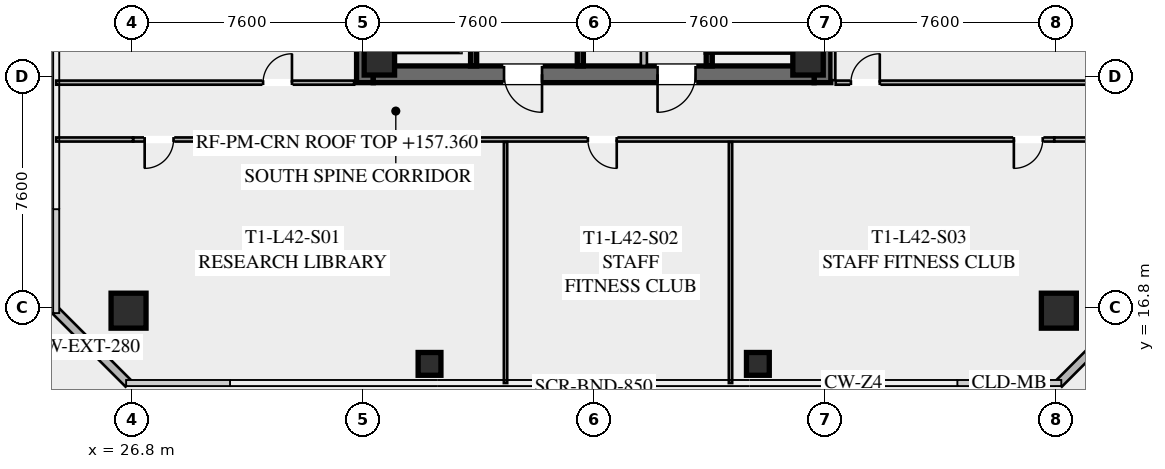
"""IFC4 building model, lengths in metres.
Left out: names, types, materials, properties, quantities, classifications, styles, units other than length and angle.
Written with IfcOpenShell. Run it as: python <this file> out.ifc"""

import sys

from ifc_helpers import new_model, si_unit, direction, frame, frame_2d, origin, origin_2d, place, context, subcontext, project, spatial, rectangle, hollow_rectangle, extrude, element, fill, save


model = new_model("IFC4")
c1 = context("Model", 3, precision=1e-05, world=origin(), true_north=direction((0.0, 1.0)))
c2 = subcontext(c1, "Body", "Model", "MODEL_VIEW")
j1 = project(units=[si_unit("LENGTHUNIT", "METRE"), si_unit("PLANEANGLEUNIT", "RADIAN")], contexts=[c1])
p1 = place(None, origin())
s1 = spatial("IfcSite", under=j1, at=p1, CompositionType="ELEMENT")
p2 = place(p1, origin())
s2 = spatial("IfcBuilding", under=s1, at=p2, CompositionType="ELEMENT")
p3 = place(p2, frame((0.0, 0.0, 157.0)))
s3 = spatial("IfcBuildingStorey", under=s2, at=p3, CompositionType="ELEMENT", Elevation=157.0)
for number, where, z_axis, x_axis in (
    (1, (34.475, 24.2, 0.0), (0.0, 0.0, 1.0), (0.0, 1.0, 0.0)),
    (2, (49.525, 39.8, 0.0), (0.0, 0.0, 1.0), (0.0, -1.0, 0.0)),
):
    element("IfcWall", number, at=place(p3, frame(where, z_axis=z_axis, x_axis=x_axis)), inside=s3, PredefinedType="SHEAR", context=c2, shape_type="SweptSolid", body=[
        extrude(rectangle(XDim=15.6, YDim=0.55, at=frame_2d((7.8, 0.0))), origin(), (0.0, 0.0, 1.0), 3.55),
    ])
p4 = place(p3, frame((49.25, 24.475, 0.0), z_axis=(0.0, 0.0, 1.0), x_axis=(-1.0, 0.0, 0.0)))
e3 = element("IfcWall", 3, at=p4, inside=s3, PredefinedType="SHEAR", context=c2, shape_type="SweptSolid", body=[
    extrude(rectangle(XDim=14.5, YDim=0.55, at=frame_2d((7.25, 0.0))), origin(), (0.0, 0.0, 1.0), 3.55),
])
p5 = place(p4, frame((8.95, 0.0, 0.0)))
e4 = element("IfcOpeningElement", 4, at=p5, cuts=e3, PredefinedType="OPENING", context=c2, shape_type="SweptSolid", body=[
    extrude(rectangle(XDim=1.25, YDim=2.25, at=frame_2d((0.625, 1.125))), frame((0.0, 0.285, 0.0), z_axis=(0.0, -1.0, 0.0), x_axis=(1.0, 0.0, 0.0)), (0.0, 0.0, 1.0), 0.57),
])
p6 = place(p4, frame((3.9, 0.0, 0.0)))
e5 = element("IfcOpeningElement", 5, at=p6, cuts=e3, PredefinedType="OPENING", context=c2, shape_type="SweptSolid", body=[
    extrude(rectangle(XDim=1.25, YDim=2.25, at=frame_2d((0.625, 1.125))), frame((0.0, 0.285, 0.0), z_axis=(0.0, -1.0, 0.0), x_axis=(1.0, 0.0, 0.0)), (0.0, 0.0, 1.0), 0.57),
])
for number, where, z_axis, x_axis in (
    (6, (34.95, 24.95, 0.0), (0.0, 0.0, 1.0), (1.0, 0.0, 0.0)),
    (7, (49.05, 24.95, 0.0), (0.0, 0.0, 1.0), (1.0, 0.0, 0.0)),
):
    element("IfcColumn", number, at=place(p3, frame(where, z_axis=z_axis, x_axis=x_axis)), inside=s3, PredefinedType="COLUMN", context=c2, shape_type="SweptSolid", body=[
        extrude(hollow_rectangle(XDim=1.0, YDim=1.0, WallThickness=0.04, at=origin_2d()), origin(), (0.0, 0.0, 1.0), 3.37),
    ])
for number, where, z_axis, x_axis in (
    (8, (26.7, 16.7, -0.175), (0.0, 0.0, 1.0), (1.0, 0.0, 0.0)),
    (9, (57.3, 16.7, -0.175), (0.0, 0.0, 1.0), (1.0, 0.0, 0.0)),
):
    element("IfcColumn", number, at=place(p3, frame(where, z_axis=z_axis, x_axis=x_axis)), inside=s3, PredefinedType="COLUMN", context=c2, shape_type="SweptSolid", body=[
        extrude(hollow_rectangle(XDim=1.15, YDim=1.15, WallThickness=0.045, at=origin_2d()), origin(), (0.0, 0.0, 1.0), 3.545),
    ])
for number, where, z_axis, x_axis in (
    (10, (36.6, 14.95, -0.175), (0.0, 0.0, 1.0), (1.0, 0.0, 0.0)),
    (11, (47.4, 14.95, -0.175), (0.0, 0.0, 1.0), (1.0, 0.0, 0.0)),
):
    element("IfcColumn", number, at=place(p3, frame(where, z_axis=z_axis, x_axis=x_axis)), inside=s3, PredefinedType="COLUMN", context=c2, shape_type="SweptSolid", body=[
        extrude(hollow_rectangle(XDim=0.75, YDim=0.75, WallThickness=0.032, at=origin_2d()), origin(), (0.0, 0.0, 1.0), 3.545),
    ])
for number, where, z_axis, x_axis in (
    (12, (26.7, 14.3, 0.0), (0.0, 0.0, 1.0), (-0.707, 0.707, 0.0)),
    (13, (59.7, 16.7, 0.0), (0.0, 0.0, 1.0), (-0.707, -0.707, 0.0)),
):
    element("IfcWall", number, at=place(p3, frame(where, z_axis=z_axis, x_axis=x_axis)), inside=s3, PredefinedType="SOLIDWALL", context=c2, shape_type="SweptSolid", body=[
        extrude(rectangle(XDim=3.394, YDim=0.28, at=frame_2d((1.697, 0.0))), origin(), (0.0, 0.0, 1.0), 3.37),
    ])
p7 = place(p3, frame((45.8, 32.8, 0.0), z_axis=(0.0, 0.0, 1.0), x_axis=(0.0, -1.0, 0.0)))
e14 = element("IfcWall", 14, at=p7, inside=s3, PredefinedType="SHEAR", context=c2, shape_type="SweptSolid", body=[
    extrude(rectangle(XDim=8.05, YDim=0.2, at=frame_2d((4.025, 0.0))), origin(), (0.0, 0.0, 1.0), 3.37),
])
p8 = place(p7, frame((0.45, 0.0, 0.0)))
e15 = element("IfcOpeningElement", 15, at=p8, cuts=e14, PredefinedType="OPENING", context=c2, shape_type="SweptSolid", body=[
    extrude(rectangle(XDim=1.15, YDim=2.2, at=frame_2d((0.575, 1.1))), frame((0.0, 0.11, 0.0), z_axis=(0.0, -1.0, 0.0), x_axis=(1.0, 0.0, 0.0)), (0.0, 0.0, 1.0), 0.22),
])
p9 = place(p3, frame((41.56, 24.75, 0.0), z_axis=(0.0, 0.0, 1.0), x_axis=(0.0, 1.0, 0.0)))
e16 = element("IfcWall", 16, at=p9, inside=s3, PredefinedType="SHEAR", context=c2, shape_type="SweptSolid", body=[
    extrude(rectangle(XDim=14.5, YDim=0.2, at=frame_2d((7.25, 0.0))), origin(), (0.0, 0.0, 1.0), 3.37),
])
p10 = place(p3, frame((38.05, 24.75, 0.0), z_axis=(0.0, 0.0, 1.0), x_axis=(0.0, 1.0, 0.0)))
e17 = element("IfcWall", 17, at=p10, inside=s3, PredefinedType="SHEAR", context=c2, shape_type="SweptSolid", body=[
    extrude(rectangle(XDim=6.45, YDim=0.2, at=frame_2d((3.225, 0.0))), origin(), (0.0, 0.0, 1.0), 3.37),
])
p11 = place(p10, frame((4.875, 0.0, 0.0)))
e18 = element("IfcOpeningElement", 18, at=p11, cuts=e17, PredefinedType="OPENING", context=c2, shape_type="SweptSolid", body=[
    extrude(rectangle(XDim=1.3, YDim=2.25, at=frame_2d((0.65, 1.125))), frame((0.0, 0.11, 0.0), z_axis=(0.0, -1.0, 0.0), x_axis=(1.0, 0.0, 0.0)), (0.0, 0.0, 1.0), 0.22),
])
p12 = place(p10, frame((2.875, 0.0, 0.0)))
e19 = element("IfcOpeningElement", 19, at=p12, cuts=e17, PredefinedType="OPENING", context=c2, shape_type="SweptSolid", body=[
    extrude(rectangle(XDim=1.3, YDim=2.25, at=frame_2d((0.65, 1.125))), frame((0.0, 0.11, 0.0), z_axis=(0.0, -1.0, 0.0), x_axis=(1.0, 0.0, 0.0)), (0.0, 0.0, 1.0), 0.22),
])
p13 = place(p10, frame((0.675, 0.0, 0.0)))
e20 = element("IfcOpeningElement", 20, at=p13, cuts=e17, PredefinedType="OPENING", context=c2, shape_type="SweptSolid", body=[
    extrude(rectangle(XDim=1.3, YDim=2.25, at=frame_2d((0.65, 1.125))), frame((0.0, 0.11, 0.0), z_axis=(0.0, -1.0, 0.0), x_axis=(1.0, 0.0, 0.0)), (0.0, 0.0, 1.0), 0.22),
])
p14 = place(p3, frame((43.65, 24.75, 0.0), z_axis=(0.0, 0.0, 1.0), x_axis=(0.0, 1.0, 0.0)))
e21 = element("IfcWall", 21, at=p14, inside=s3, PredefinedType="SOLIDWALL", context=c2, shape_type="SweptSolid", body=[
    extrude(rectangle(XDim=6.9, YDim=0.2, at=frame_2d((3.45, 0.0))), origin(), (0.0, 0.0, 1.0), 2.723),
])
p15 = place(p14, frame((0.85, 0.0, 0.0)))
e22 = element("IfcOpeningElement", 22, at=p15, cuts=e21, PredefinedType="OPENING", context=c2, shape_type="SweptSolid", body=[
    extrude(rectangle(XDim=0.95, YDim=2.05, at=frame_2d((0.475, 1.025))), frame((0.0, 0.11, 0.0), z_axis=(0.0, -1.0, 0.0), x_axis=(1.0, 0.0, 0.0)), (0.0, 0.0, 1.0), 0.22),
])
p16 = place(p14, frame((4.8, 0.0, 0.0)))
e23 = element("IfcOpeningElement", 23, at=p16, cuts=e21, PredefinedType="OPENING", context=c2, shape_type="SweptSolid", body=[
    extrude(rectangle(XDim=1.05, YDim=2.2, at=frame_2d((0.525, 1.1))), frame((0.0, 0.11, 0.0), z_axis=(0.0, -1.0, 0.0), x_axis=(1.0, 0.0, 0.0)), (0.0, 0.0, 1.0), 0.22),
])
p17 = place(p3, frame((57.15, 22.33, 0.0), z_axis=(0.0, 0.0, 1.0), x_axis=(-1.0, 0.0, 0.0)))
e24 = element("IfcWall", 24, at=p17, inside=s3, PredefinedType="PARTITIONING", context=c2, shape_type="SweptSolid", body=[
    extrude(rectangle(XDim=30.3, YDim=0.135, at=frame_2d((15.15, 0.0))), origin(), (0.0, 0.0, 1.0), 2.723),
])
p18 = place(p17, frame((28.97, 0.0, 0.0)))
e25 = element("IfcOpeningElement", 25, at=p18, cuts=e24, PredefinedType="OPENING", context=c2, shape_type="SweptSolid", body=[
    extrude(rectangle(XDim=0.95, YDim=2.05, at=frame_2d((0.475, 1.025))), frame((0.0, 0.077, 0.0), z_axis=(0.0, -1.0, 0.0), x_axis=(1.0, 0.0, 0.0)), (0.0, 0.0, 1.0), 0.155),
])
p19 = place(p17, frame((14.392, 0.0, 0.0)))
e26 = element("IfcOpeningElement", 26, at=p19, cuts=e24, PredefinedType="OPENING", context=c2, shape_type="SweptSolid", body=[
    extrude(rectangle(XDim=0.95, YDim=2.05, at=frame_2d((0.475, 1.025))), frame((0.0, 0.077, 0.0), z_axis=(0.0, -1.0, 0.0), x_axis=(1.0, 0.0, 0.0)), (0.0, 0.0, 1.0), 0.155),
])
p20 = place(p17, frame((0.38, 0.0, 0.0)))
e27 = element("IfcOpeningElement", 27, at=p20, cuts=e24, PredefinedType="OPENING", context=c2, shape_type="SweptSolid", body=[
    extrude(rectangle(XDim=0.95, YDim=2.05, at=frame_2d((0.475, 1.025))), frame((0.0, 0.077, 0.0), z_axis=(0.0, -1.0, 0.0), x_axis=(1.0, 0.0, 0.0)), (0.0, 0.0, 1.0), 0.155),
])
for number, where, z_axis, x_axis in (
    (28, (24.32, 22.33, 0.0), (0.0, 0.0, 1.0), (1.0, 0.0, 0.0)),
    (29, (57.15, 22.33, 0.0), (0.0, 0.0, 1.0), (1.0, 0.0, 0.0)),
):
    element("IfcWall", number, at=place(p3, frame(where, z_axis=z_axis, x_axis=x_axis)), inside=s3, PredefinedType="PARTITIONING", context=c2, shape_type="SweptSolid", body=[
        extrude(rectangle(XDim=2.53, YDim=0.135, at=frame_2d((1.265, 0.0))), origin(), (0.0, 0.0, 1.0), 2.723),
    ])
for number, where, z_axis, x_axis in (
    (30, (39.1, 14.32, 0.0), (0.0, 0.0, 1.0), (0.0, 1.0, 0.0)),
    (31, (46.5, 14.32, 0.0), (0.0, 0.0, 1.0), (0.0, 1.0, 0.0)),
):
    element("IfcWall", number, at=place(p3, frame(where, z_axis=z_axis, x_axis=x_axis)), inside=s3, PredefinedType="PARTITIONING", context=c2, shape_type="SweptSolid", body=[
        extrude(rectangle(XDim=7.93, YDim=0.11, at=frame_2d((3.965, 0.0))), origin(), (0.0, 0.0, 1.0), 2.723),
    ])
p21 = place(p3, frame((49.88, 39.72, 0.0), z_axis=(0.0, 0.0, 1.0), x_axis=(0.0, -1.0, 0.0)))
e32 = element("IfcWall", 32, at=p21, inside=s3, PredefinedType="PARTITIONING", context=c2, shape_type="SweptSolid", body=[
    extrude(rectangle(XDim=15.44, YDim=0.135, at=frame_2d((7.72, 0.0))), origin(), (0.0, 0.0, 1.0), 2.723),
])
p22 = place(p3, frame((49.96, 24.2, 0.0), z_axis=(0.0, 0.0, 1.0), x_axis=(1.0, 0.0, 0.0)))
e33 = element("IfcWall", 33, at=p22, inside=s3, PredefinedType="PARTITIONING", context=c2, shape_type="SweptSolid", body=[
    extrude(rectangle(XDim=9.72, YDim=0.135, at=frame_2d((4.86, 0.0))), origin(), (0.0, 0.0, 1.0), 2.723),
])
p23 = place(p22, frame((0.5, 0.0, 0.0)))
e34 = element("IfcOpeningElement", 34, at=p23, cuts=e33, PredefinedType="OPENING", context=c2, shape_type="SweptSolid", body=[
    extrude(rectangle(XDim=0.95, YDim=2.05, at=frame_2d((0.475, 1.025))), frame((0.0, 0.077, 0.0), z_axis=(0.0, -1.0, 0.0), x_axis=(1.0, 0.0, 0.0)), (0.0, 0.0, 1.0), 0.155),
])
p24 = place(p3, frame((24.32, 24.2, 0.0), z_axis=(0.0, 0.0, 1.0), x_axis=(1.0, 0.0, 0.0)))
e35 = element("IfcWall", 35, at=p24, inside=s3, PredefinedType="PARTITIONING", context=c2, shape_type="SweptSolid", body=[
    extrude(rectangle(XDim=9.8, YDim=0.135, at=frame_2d((4.9, 0.0))), origin(), (0.0, 0.0, 1.0), 2.723),
])
p25 = place(p24, frame((6.805, 0.0, 0.0)))
e36 = element("IfcOpeningElement", 36, at=p25, cuts=e35, PredefinedType="OPENING", context=c2, shape_type="SweptSolid", body=[
    extrude(rectangle(XDim=0.95, YDim=2.05, at=frame_2d((0.475, 1.025))), frame((0.0, 0.077, 0.0), z_axis=(0.0, -1.0, 0.0), x_axis=(1.0, 0.0, 0.0)), (0.0, 0.0, 1.0), 0.155),
])
p26 = place(p5, origin())
e37 = element("IfcDoor", 37, at=p26, inside=s3, OperationType="SINGLE_SWING_LEFT", PredefinedType="DOOR", context=c2, shape_type="SweptSolid", body=[
    extrude(rectangle(XDim=1.25, YDim=2.25, at=frame_2d((0.625, 1.125))), frame((0.0, 0.025, 0.0), z_axis=(0.0, -1.0, 0.0), x_axis=(1.0, 0.0, 0.0)), (0.0, 0.0, 1.0), 0.05),
])
fill(e4, e37)
p27 = place(p6, origin())
e38 = element("IfcDoor", 38, at=p27, inside=s3, OperationType="SINGLE_SWING_RIGHT", PredefinedType="DOOR", context=c2, shape_type="SweptSolid", body=[
    extrude(rectangle(XDim=1.25, YDim=2.25, at=frame_2d((0.625, 1.125))), frame((0.0, 0.025, 0.0), z_axis=(0.0, -1.0, 0.0), x_axis=(1.0, 0.0, 0.0)), (0.0, 0.0, 1.0), 0.05),
])
fill(e5, e38)
p28 = place(p18, origin())
e39 = element("IfcDoor", 39, at=p28, inside=s3, OperationType="SINGLE_SWING_RIGHT", PredefinedType="DOOR", context=c2, shape_type="SweptSolid", body=[
    extrude(rectangle(XDim=0.95, YDim=2.05, at=frame_2d((0.475, 1.025))), frame((0.0, 0.025, 0.0), z_axis=(0.0, -1.0, 0.0), x_axis=(1.0, 0.0, 0.0)), (0.0, 0.0, 1.0), 0.05),
])
fill(e25, e39)
p29 = place(p19, origin())
e40 = element("IfcDoor", 40, at=p29, inside=s3, OperationType="SINGLE_SWING_LEFT", PredefinedType="DOOR", context=c2, shape_type="SweptSolid", body=[
    extrude(rectangle(XDim=0.95, YDim=2.05, at=frame_2d((0.475, 1.025))), frame((0.0, 0.025, 0.0), z_axis=(0.0, -1.0, 0.0), x_axis=(1.0, 0.0, 0.0)), (0.0, 0.0, 1.0), 0.05),
])
fill(e26, e40)
p30 = place(p20, origin())
e41 = element("IfcDoor", 41, at=p30, inside=s3, OperationType="SINGLE_SWING_RIGHT", PredefinedType="DOOR", context=c2, shape_type="SweptSolid", body=[
    extrude(rectangle(XDim=0.95, YDim=2.05, at=frame_2d((0.475, 1.025))), frame((0.0, 0.025, 0.0), z_axis=(0.0, -1.0, 0.0), x_axis=(1.0, 0.0, 0.0)), (0.0, 0.0, 1.0), 0.05),
])
fill(e27, e41)
p31 = place(p23, origin())
e42 = element("IfcDoor", 42, at=p31, inside=s3, OperationType="SINGLE_SWING_RIGHT", PredefinedType="DOOR", context=c2, shape_type="SweptSolid", body=[
    extrude(rectangle(XDim=0.95, YDim=2.05, at=frame_2d((0.475, 1.025))), frame((0.0, 0.025, 0.0), z_axis=(0.0, -1.0, 0.0), x_axis=(1.0, 0.0, 0.0)), (0.0, 0.0, 1.0), 0.05),
])
fill(e34, e42)
p32 = place(p25, origin())
e43 = element("IfcDoor", 43, at=p32, inside=s3, OperationType="SINGLE_SWING_RIGHT", PredefinedType="DOOR", context=c2, shape_type="SweptSolid", body=[
    extrude(rectangle(XDim=0.95, YDim=2.05, at=frame_2d((0.475, 1.025))), frame((0.0, 0.025, 0.0), z_axis=(0.0, -1.0, 0.0), x_axis=(1.0, 0.0, 0.0)), (0.0, 0.0, 1.0), 0.05),
])
fill(e36, e43)
save(model, sys.argv[1])
